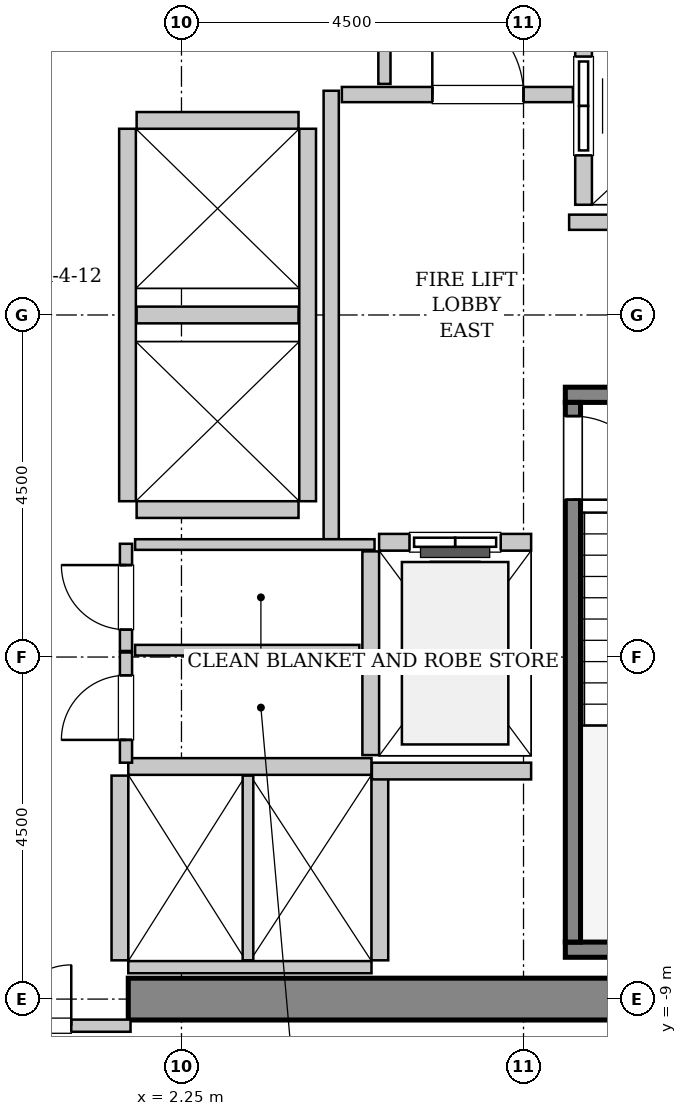
"""IFC4 building model, lengths in metres.
Left out: names, types, materials, properties, quantities, classifications, styles, units other than length and angle.
Written with IfcOpenShell. Run it as: python <this file> out.ifc"""

import sys

from ifc_helpers import new_model, si_unit, direction, frame, frame_2d, origin, place, context, subcontext, project, spatial, rectangle, extrude, source, transform, mapped, element, fill, save


model = new_model("IFC4")
c1 = context("Model", 3, precision=1e-05, world=origin(), true_north=direction((0.0, 1.0)))
c2 = subcontext(c1, "Body", "Model", "MODEL_VIEW")
j1 = project(units=[si_unit("LENGTHUNIT", "METRE"), si_unit("PLANEANGLEUNIT", "RADIAN")], contexts=[c1])
p1 = place(None, origin())
s1 = spatial("IfcSite", under=j1, at=p1, CompositionType="ELEMENT")
p2 = place(p1, origin())
s2 = spatial("IfcBuilding", under=s1, at=p2, CompositionType="ELEMENT")
p3 = place(p2, frame((0.0, 0.0, 106.0)))
s3 = spatial("IfcBuildingStorey", under=s2, at=p3, CompositionType="ELEMENT", Elevation=106.0)
m1 = source(origin(), c2, "Body", "SweptSolid", [
    extrude(rectangle(XDim=9.975, YDim=0.55, at=frame_2d((4.987, 0.0))), origin(), (0.0, 0.0, 1.0), 3.8),
])
p4 = place(p3, frame((1.55, -9.0, 0.0), z_axis=(0.0, 0.0, 1.0), x_axis=(1.0, 0.0, 0.0)))
e1 = element("IfcWall", 1, at=p4, inside=s3, PredefinedType="SHEAR", context=c2, shape_type="MappedRepresentation", body=[
    mapped(m1, transform((0.0, 0.0, 0.0), x_axis=(1.0, 0.0, 0.0), y_axis=(0.0, 1.0, 0.0), z_axis=(0.0, 0.0, 1.0), scale=1.0)),
])
m2 = source(origin(), c2, "Body", "SweptSolid", [
    extrude(rectangle(XDim=3.4, YDim=0.2, at=frame_2d((1.7, 0.0))), origin(), (0.0, 0.0, 1.0), 3.8),
])
p5 = place(p3, frame((7.3, -1.05, 0.0), z_axis=(0.0, 0.0, 1.0), x_axis=(1.0, 0.0, 0.0)))
e2 = element("IfcWall", 2, at=p5, inside=s3, PredefinedType="SOLIDWALL", context=c2, shape_type="MappedRepresentation", body=[
    mapped(m2, transform((0.0, 0.0, 0.0), x_axis=(1.0, 0.0, 0.0), y_axis=(0.0, 1.0, 0.0), z_axis=(0.0, 0.0, 1.0), scale=1.0)),
])
m3 = source(origin(), c2, "Body", "SweptSolid", [
    extrude(rectangle(XDim=3.68, YDim=0.2, at=frame_2d((1.84, 0.0))), origin(), (0.0, 0.0, 1.0), 3.8),
])
p6 = place(p3, frame((7.3, -8.35, 0.0), z_axis=(0.0, 0.0, 1.0), x_axis=(1.0, 0.0, 0.0)))
e3 = element("IfcWall", 3, at=p6, inside=s3, PredefinedType="SOLIDWALL", context=c2, shape_type="MappedRepresentation", body=[
    mapped(m3, transform((0.0, 0.0, 0.0), x_axis=(1.0, 0.0, 0.0), y_axis=(0.0, 1.0, 0.0), z_axis=(0.0, 0.0, 1.0), scale=1.0)),
])
m4 = source(origin(), c2, "Body", "SweptSolid", [
    extrude(rectangle(XDim=7.1, YDim=0.2, at=frame_2d((3.55, 0.0))), origin(), (0.0, 0.0, 1.0), 3.8),
])
p7 = place(p3, frame((7.4, -1.15, 0.0), z_axis=(0.0, 0.0, 1.0), x_axis=(0.0, -1.0, 0.0)))
e4 = element("IfcWall", 4, at=p7, inside=s3, PredefinedType="SOLIDWALL", context=c2, shape_type="MappedRepresentation", body=[
    mapped(m4, transform((0.0, 0.0, 0.0), x_axis=(1.0, 0.0, 0.0), y_axis=(0.0, 1.0, 0.0), z_axis=(0.0, 0.0, 1.0), scale=1.0)),
])
p8 = place(p7, frame((0.18, 0.0, 0.0)))
e5 = element("IfcOpeningElement", 5, at=p8, cuts=e4, PredefinedType="OPENING", context=c2, shape_type="SweptSolid", body=[
    extrude(rectangle(XDim=1.1, YDim=2.15, at=frame_2d((0.55, 1.075))), frame((0.0, 0.11, 0.0), z_axis=(0.0, -1.0, 0.0), x_axis=(1.0, 0.0, 0.0)), (0.0, 0.0, 1.0), 0.22),
])
m5 = source(origin(), c2, "Body", "SweptSolid", [
    extrude(rectangle(XDim=2.0, YDim=0.22, at=frame_2d((1.0, 0.0))), origin(), (0.0, 0.0, 1.0), 3.535),
])
p9 = place(p3, frame((6.85, -2.99, 0.0), z_axis=(0.0, 0.0, 1.0), x_axis=(-1.0, 0.0, 0.0)))
e6 = element("IfcWall", 6, at=p9, inside=s3, PredefinedType="SOLIDWALL", context=c2, shape_type="MappedRepresentation", body=[
    mapped(m5, transform((0.0, 0.0, 0.0), x_axis=(1.0, 0.0, 0.0), y_axis=(0.0, 1.0, 0.0), z_axis=(0.0, 0.0, 1.0), scale=1.0)),
])
p10 = place(p9, frame((0.4, 0.0, 0.0)))
e7 = element("IfcOpeningElement", 7, at=p10, cuts=e6, PredefinedType="OPENING", context=c2, shape_type="SweptSolid", body=[
    extrude(rectangle(XDim=1.2, YDim=2.2, at=frame_2d((0.6, 1.1))), frame((0.0, 0.12, 0.0), z_axis=(0.0, -1.0, 0.0), x_axis=(1.0, 0.0, 0.0)), (0.0, 0.0, 1.0), 0.24),
])
m6 = source(origin(), c2, "Body", "SweptSolid", [
    extrude(rectangle(XDim=2.68, YDim=0.22, at=frame_2d((1.34, 0.0))), origin(), (0.0, 0.0, 1.0), 3.535),
])
p11 = place(p3, frame((4.74, -3.11, 0.0), z_axis=(0.0, 0.0, 1.0), x_axis=(0.0, -1.0, 0.0)))
e8 = element("IfcWall", 8, at=p11, inside=s3, PredefinedType="SOLIDWALL", context=c2, shape_type="MappedRepresentation", body=[
    mapped(m6, transform((0.0, 0.0, 0.0), x_axis=(1.0, 0.0, 0.0), y_axis=(0.0, 1.0, 0.0), z_axis=(0.0, 0.0, 1.0), scale=1.0)),
])
m7 = source(origin(), c2, "Body", "SweptSolid", [
    extrude(rectangle(XDim=5.45, YDim=0.22, at=frame_2d((2.725, 0.0))), origin(), (0.0, 0.0, 1.0), 3.535),
])
p12 = place(p3, frame((7.54, 6.9, 0.0), z_axis=(0.0, 0.0, 1.0), x_axis=(0.0, -1.0, 0.0)))
e9 = element("IfcWall", 9, at=p12, inside=s3, PredefinedType="SOLIDWALL", context=c2, shape_type="MappedRepresentation", body=[
    mapped(m7, transform((0.0, 0.0, 0.0), x_axis=(1.0, 0.0, 0.0), y_axis=(0.0, 1.0, 0.0), z_axis=(0.0, 0.0, 1.0), scale=1.0)),
])
p13 = place(p12, frame((3.5, 0.0, 0.0)))
e10 = element("IfcOpeningElement", 10, at=p13, cuts=e9, PredefinedType="OPENING", context=c2, shape_type="SweptSolid", body=[
    extrude(rectangle(XDim=1.3, YDim=2.3, at=frame_2d((0.65, 1.15))), frame((0.0, 0.12, 0.0), z_axis=(0.0, -1.0, 0.0), x_axis=(1.0, 0.0, 0.0)), (0.0, 0.0, 1.0), 0.24),
])
p14 = place(p12, frame((0.65, 0.0, 0.0)))
e11 = element("IfcOpeningElement", 11, at=p14, cuts=e9, PredefinedType="OPENING", context=c2, shape_type="SweptSolid", body=[
    extrude(rectangle(XDim=1.3, YDim=2.3, at=frame_2d((0.65, 1.15))), frame((0.0, 0.12, 0.0), z_axis=(0.0, -1.0, 0.0), x_axis=(1.0, 0.0, 0.0)), (0.0, 0.0, 1.0), 0.24),
])
m8 = source(origin(), c2, "Body", "SweptSolid", [
    extrude(rectangle(XDim=3.2, YDim=0.22, at=frame_2d((1.6, 0.0))), origin(), (0.0, 0.0, 1.0), 3.535),
])
p15 = place(p3, frame((4.75, -5.94, 0.0), z_axis=(0.0, 0.0, 1.0), x_axis=(-1.0, 0.0, 0.0)))
e12 = element("IfcWall", 12, at=p15, inside=s3, PredefinedType="SOLIDWALL", context=c2, shape_type="MappedRepresentation", body=[
    mapped(m8, transform((0.0, 0.0, 0.0), x_axis=(1.0, 0.0, 0.0), y_axis=(0.0, 1.0, 0.0), z_axis=(0.0, 0.0, 1.0), scale=1.0)),
])
m9 = source(origin(), c2, "Body", "SweptSolid", [
    extrude(rectangle(XDim=3.2, YDim=0.16, at=frame_2d((1.6, 0.0))), origin(), (0.0, 0.0, 1.0), 2.425),
])
p16 = place(p3, frame((1.55, -8.58, 0.0), z_axis=(0.0, 0.0, 1.0), x_axis=(1.0, 0.0, 0.0)))
e13 = element("IfcWall", 13, at=p16, inside=s3, PredefinedType="PARTITIONING", context=c2, shape_type="MappedRepresentation", body=[
    mapped(m9, transform((0.0, 0.0, 0.0), x_axis=(1.0, 0.0, 0.0), y_axis=(0.0, 1.0, 0.0), z_axis=(0.0, 0.0, 1.0), scale=1.0)),
])
m10 = source(origin(), c2, "Body", "SweptSolid", [
    extrude(rectangle(XDim=2.43, YDim=0.22, at=frame_2d((1.215, 0.0))), origin(), (0.0, 0.0, 1.0), 3.535),
])
p17 = place(p3, frame((1.44, -6.06, 0.0), z_axis=(0.0, 0.0, 1.0), x_axis=(0.0, -1.0, 0.0)))
e14 = element("IfcWall", 14, at=p17, inside=s3, PredefinedType="SOLIDWALL", context=c2, shape_type="MappedRepresentation", body=[
    mapped(m10, transform((0.0, 0.0, 0.0), x_axis=(1.0, 0.0, 0.0), y_axis=(0.0, 1.0, 0.0), z_axis=(0.0, 0.0, 1.0), scale=1.0)),
])
m11 = source(origin(), c2, "Body", "SweptSolid", [
    extrude(rectangle(XDim=2.43, YDim=0.14, at=frame_2d((1.215, 0.0))), origin(), (0.0, 0.0, 1.0), 3.535),
])
p18 = place(p3, frame((3.125, -8.49, 0.0), z_axis=(0.0, 0.0, 1.0), x_axis=(0.0, 1.0, 0.0)))
e15 = element("IfcWall", 15, at=p18, inside=s3, PredefinedType="PARTITIONING", context=c2, shape_type="MappedRepresentation", body=[
    mapped(m11, transform((0.0, 0.0, 0.0), x_axis=(1.0, 0.0, 0.0), y_axis=(0.0, 1.0, 0.0), z_axis=(0.0, 0.0, 1.0), scale=1.0)),
])
p19 = place(p3, frame((4.86, -8.49, 0.0), z_axis=(0.0, 0.0, 1.0), x_axis=(0.0, 1.0, 0.0)))
e16 = element("IfcWall", 16, at=p19, inside=s3, PredefinedType="SOLIDWALL", context=c2, shape_type="MappedRepresentation", body=[
    mapped(m10, transform((0.0, 0.0, 0.0), x_axis=(1.0, 0.0, 0.0), y_axis=(0.0, 1.0, 0.0), z_axis=(0.0, 0.0, 1.0), scale=1.0)),
])
m12 = source(origin(), c2, "Body", "SweptSolid", [
    extrude(rectangle(XDim=4.9, YDim=0.22, at=frame_2d((2.45, 0.0))), origin(), (0.0, 0.0, 1.0), 3.535),
])
for number, where, z_axis, x_axis in (
    (17, (1.54, 2.45, 0.0), (0.0, 0.0, 1.0), (0.0, -1.0, 0.0)),
    (18, (3.91, -2.45, 0.0), (0.0, 0.0, 1.0), (0.0, 1.0, 0.0)),
):
    element("IfcWall", number, at=place(p3, frame(where, z_axis=z_axis, x_axis=x_axis)), inside=s3, PredefinedType="SOLIDWALL", context=c2, shape_type="MappedRepresentation", body=[
        mapped(m12, transform((0.0, 0.0, 0.0), x_axis=(1.0, 0.0, 0.0), y_axis=(0.0, 1.0, 0.0), z_axis=(0.0, 0.0, 1.0), scale=1.0)),
    ])
m13 = source(origin(), c2, "Body", "SweptSolid", [
    extrude(rectangle(XDim=2.13, YDim=0.22, at=frame_2d((1.065, 0.0))), origin(), (0.0, 0.0, 1.0), 3.535),
])
for number, where, z_axis, x_axis in (
    (19, (1.66, -2.56, 0.0), (0.0, 0.0, 1.0), (1.0, 0.0, 0.0)),
    (20, (1.66, 0.0, 0.0), (0.0, 0.0, 1.0), (1.0, 0.0, 0.0)),
    (21, (3.79, 2.56, 0.0), (0.0, 0.0, 1.0), (-1.0, 0.0, 0.0)),
):
    element("IfcWall", number, at=place(p3, frame(where, z_axis=z_axis, x_axis=x_axis)), inside=s3, PredefinedType="SOLIDWALL", context=c2, shape_type="MappedRepresentation", body=[
        mapped(m13, transform((0.0, 0.0, 0.0), x_axis=(1.0, 0.0, 0.0), y_axis=(0.0, 1.0, 0.0), z_axis=(0.0, 0.0, 1.0), scale=1.0)),
    ])
m14 = source(origin(), c2, "Body", "SweptSolid", [
    extrude(rectangle(XDim=2.095, YDim=0.22, at=frame_2d((1.048, 0.0))), origin(), (0.0, 0.0, 1.0), 3.535),
])
p20 = place(p3, frame((4.755, -6.0, 0.0), z_axis=(0.0, 0.0, 1.0), x_axis=(1.0, 0.0, 0.0)))
e22 = element("IfcWall", 22, at=p20, inside=s3, PredefinedType="SOLIDWALL", context=c2, shape_type="MappedRepresentation", body=[
    mapped(m14, transform((0.0, 0.0, 0.0), x_axis=(1.0, 0.0, 0.0), y_axis=(0.0, 1.0, 0.0), z_axis=(0.0, 0.0, 1.0), scale=1.0)),
])
m15 = source(origin(), c2, "Body", "SweptSolid", [
    extrude(rectangle(XDim=5.9, YDim=0.2, at=frame_2d((2.95, 0.0))), origin(), (0.0, 0.0, 1.0), 3.535),
])
p21 = place(p3, frame((4.22, -2.95, 0.0), z_axis=(0.0, 0.0, 1.0), x_axis=(0.0, 1.0, 0.0)))
e23 = element("IfcWall", 23, at=p21, inside=s3, PredefinedType="PARTITIONING", context=c2, shape_type="MappedRepresentation", body=[
    mapped(m15, transform((0.0, 0.0, 0.0), x_axis=(1.0, 0.0, 0.0), y_axis=(0.0, 1.0, 0.0), z_axis=(0.0, 0.0, 1.0), scale=1.0)),
])
m16 = source(origin(), c2, "Body", "SweptSolid", [
    extrude(rectangle(XDim=3.04, YDim=0.2, at=frame_2d((1.52, 0.0))), origin(), (0.0, 0.0, 1.0), 3.535),
])
p22 = place(p3, frame((4.36, 2.9, 0.0), z_axis=(0.0, 0.0, 1.0), x_axis=(1.0, 0.0, 0.0)))
e24 = element("IfcWall", 24, at=p22, inside=s3, PredefinedType="PARTITIONING", context=c2, shape_type="MappedRepresentation", body=[
    mapped(m16, transform((0.0, 0.0, 0.0), x_axis=(1.0, 0.0, 0.0), y_axis=(0.0, 1.0, 0.0), z_axis=(0.0, 0.0, 1.0), scale=1.0)),
])
p23 = place(p22, frame((1.19, 0.0, 0.0)))
e25 = element("IfcOpeningElement", 25, at=p23, cuts=e24, PredefinedType="OPENING", context=c2, shape_type="SweptSolid", body=[
    extrude(rectangle(XDim=1.2, YDim=2.15, at=frame_2d((0.6, 1.075))), frame((0.0, 0.11, 0.0), z_axis=(0.0, -1.0, 0.0), x_axis=(1.0, 0.0, 0.0)), (0.0, 0.0, 1.0), 0.22),
])
m17 = source(origin(), c2, "Body", "SweptSolid", [
    extrude(rectangle(XDim=4.11, YDim=0.2, at=frame_2d((2.055, 0.0))), origin(), (0.0, 0.0, 1.0), 3.535),
])
p24 = place(p3, frame((7.35, 1.22, 0.0), z_axis=(0.0, 0.0, 1.0), x_axis=(1.0, 0.0, 0.0)))
e26 = element("IfcWall", 26, at=p24, inside=s3, PredefinedType="PARTITIONING", context=c2, shape_type="MappedRepresentation", body=[
    mapped(m17, transform((0.0, 0.0, 0.0), x_axis=(1.0, 0.0, 0.0), y_axis=(0.0, 1.0, 0.0), z_axis=(0.0, 0.0, 1.0), scale=1.0)),
])
m18 = source(origin(), c2, "Body", "SweptSolid", [
    extrude(rectangle(XDim=3.16, YDim=0.16, at=frame_2d((1.58, 0.0))), origin(), (0.0, 0.0, 1.0), 2.425),
])
p25 = place(p3, frame((-1.58, -9.35, 0.0), z_axis=(0.0, 0.0, 1.0), x_axis=(1.0, 0.0, 0.0)))
e27 = element("IfcWall", 27, at=p25, inside=s3, PredefinedType="PARTITIONING", context=c2, shape_type="MappedRepresentation", body=[
    mapped(m18, transform((0.0, 0.0, 0.0), x_axis=(1.0, 0.0, 0.0), y_axis=(0.0, 1.0, 0.0), z_axis=(0.0, 0.0, 1.0), scale=1.0)),
])
p26 = place(p25, frame((0.78, 0.0, 0.0)))
e28 = element("IfcOpeningElement", 28, at=p26, cuts=e27, PredefinedType="OPENING", context=c2, shape_type="SweptSolid", body=[
    extrude(rectangle(XDim=1.6, YDim=2.3, at=frame_2d((0.8, 1.15))), frame((0.0, 0.09, 0.0), z_axis=(0.0, -1.0, 0.0), x_axis=(1.0, 0.0, 0.0)), (0.0, 0.0, 1.0), 0.18),
])
m19 = source(origin(), c2, "Body", "SweptSolid", [
    extrude(rectangle(XDim=3.015, YDim=0.16, at=frame_2d((1.507, 0.0))), origin(), (0.0, 0.0, 1.0), 3.535),
])
p27 = place(p3, frame((4.92, 3.04, 0.0), z_axis=(0.0, 0.0, 1.0), x_axis=(0.0, 1.0, 0.0)))
e29 = element("IfcWall", 29, at=p27, inside=s3, PredefinedType="PARTITIONING", context=c2, shape_type="MappedRepresentation", body=[
    mapped(m19, transform((0.0, 0.0, 0.0), x_axis=(1.0, 0.0, 0.0), y_axis=(0.0, 1.0, 0.0), z_axis=(0.0, 0.0, 1.0), scale=1.0)),
])
m20 = source(origin(), c2, "Body", "SweptSolid", [
    extrude(rectangle(XDim=1.41, YDim=0.16, at=frame_2d((0.705, 0.0))), origin(), (0.0, 0.0, 1.0), 3.535),
])
p28 = place(p3, frame((1.52, -4.42, 0.0), z_axis=(0.0, 0.0, 1.0), x_axis=(0.0, 1.0, 0.0)))
e30 = element("IfcWall", 30, at=p28, inside=s3, PredefinedType="PARTITIONING", context=c2, shape_type="MappedRepresentation", body=[
    mapped(m20, transform((0.0, 0.0, 0.0), x_axis=(1.0, 0.0, 0.0), y_axis=(0.0, 1.0, 0.0), z_axis=(0.0, 0.0, 1.0), scale=1.0)),
])
p29 = place(p28, frame((0.28, 0.0, 0.0)))
e31 = element("IfcOpeningElement", 31, at=p29, cuts=e30, PredefinedType="OPENING", context=c2, shape_type="SweptSolid", body=[
    extrude(rectangle(XDim=0.85, YDim=2.1, at=frame_2d((0.425, 1.05))), frame((0.0, 0.09, 0.0), z_axis=(0.0, -1.0, 0.0), x_axis=(1.0, 0.0, 0.0)), (0.0, 0.0, 1.0), 0.18),
])
m21 = source(origin(), c2, "Body", "SweptSolid", [
    extrude(rectangle(XDim=3.15, YDim=0.14, at=frame_2d((1.575, 0.0))), origin(), (0.0, 0.0, 1.0), 3.535),
])
p30 = place(p3, frame((1.64, -3.02, 0.0), z_axis=(0.0, 0.0, 1.0), x_axis=(1.0, 0.0, 0.0)))
e32 = element("IfcWall", 32, at=p30, inside=s3, PredefinedType="PARTITIONING", context=c2, shape_type="MappedRepresentation", body=[
    mapped(m21, transform((0.0, 0.0, 0.0), x_axis=(1.0, 0.0, 0.0), y_axis=(0.0, 1.0, 0.0), z_axis=(0.0, 0.0, 1.0), scale=1.0)),
])
m22 = source(origin(), c2, "Body", "SweptSolid", [
    extrude(rectangle(XDim=2.95, YDim=0.14, at=frame_2d((1.475, 0.0))), origin(), (0.0, 0.0, 1.0), 3.535),
])
p31 = place(p3, frame((1.64, -4.41, 0.0), z_axis=(0.0, 0.0, 1.0), x_axis=(1.0, 0.0, 0.0)))
e33 = element("IfcWall", 33, at=p31, inside=s3, PredefinedType="PARTITIONING", context=c2, shape_type="MappedRepresentation", body=[
    mapped(m22, transform((0.0, 0.0, 0.0), x_axis=(1.0, 0.0, 0.0), y_axis=(0.0, 1.0, 0.0), z_axis=(0.0, 0.0, 1.0), scale=1.0)),
])
m23 = source(origin(), c2, "Body", "SweptSolid", [
    extrude(rectangle(XDim=1.45, YDim=0.16, at=frame_2d((0.725, 0.0))), origin(), (0.0, 0.0, 1.0), 3.535),
])
p32 = place(p3, frame((1.52, -5.89, 0.0), z_axis=(0.0, 0.0, 1.0), x_axis=(0.0, 1.0, 0.0)))
e34 = element("IfcWall", 34, at=p32, inside=s3, PredefinedType="PARTITIONING", context=c2, shape_type="MappedRepresentation", body=[
    mapped(m23, transform((0.0, 0.0, 0.0), x_axis=(1.0, 0.0, 0.0), y_axis=(0.0, 1.0, 0.0), z_axis=(0.0, 0.0, 1.0), scale=1.0)),
])
p33 = place(p32, frame((0.3, 0.0, 0.0)))
e35 = element("IfcOpeningElement", 35, at=p33, cuts=e34, PredefinedType="OPENING", context=c2, shape_type="SweptSolid", body=[
    extrude(rectangle(XDim=0.85, YDim=2.1, at=frame_2d((0.425, 1.05))), frame((0.0, 0.09, 0.0), z_axis=(0.0, -1.0, 0.0), x_axis=(1.0, 0.0, 0.0)), (0.0, 0.0, 1.0), 0.18),
])
m24 = source(origin(), c2, "Body", "SweptSolid", [
    extrude(rectangle(XDim=1.1, YDim=2.15, at=frame_2d((0.55, 1.075))), frame((0.0, 0.025, 0.0), z_axis=(0.0, -1.0, 0.0), x_axis=(1.0, 0.0, 0.0)), (0.0, 0.0, 1.0), 0.05),
])
p34 = place(p8, origin())
e36 = element("IfcDoor", 36, at=p34, inside=s3, OperationType="SINGLE_SWING_RIGHT", PredefinedType="DOOR", context=c2, shape_type="MappedRepresentation", body=[
    mapped(m24, transform((0.0, 0.0, 0.0), x_axis=(1.0, 0.0, 0.0), y_axis=(0.0, 1.0, 0.0), z_axis=(0.0, 0.0, 1.0), scale=1.0)),
])
fill(e5, e36)
m25 = source(origin(), c2, "Body", "SweptSolid", [
    extrude(rectangle(XDim=1.2, YDim=2.2, at=frame_2d((0.6, 1.1))), frame((0.0, 0.025, 0.0), z_axis=(0.0, -1.0, 0.0), x_axis=(1.0, 0.0, 0.0)), (0.0, 0.0, 1.0), 0.05),
])
p35 = place(p10, origin())
e37 = element("IfcDoor", 37, at=p35, inside=s3, OperationType="SLIDING_TO_LEFT", PredefinedType="DOOR", context=c2, shape_type="MappedRepresentation", body=[
    mapped(m25, transform((0.0, 0.0, 0.0), x_axis=(1.0, 0.0, 0.0), y_axis=(0.0, 1.0, 0.0), z_axis=(0.0, 0.0, 1.0), scale=1.0)),
])
fill(e7, e37)
m26 = source(origin(), c2, "Body", "SweptSolid", [
    extrude(rectangle(XDim=1.3, YDim=2.3, at=frame_2d((0.65, 1.15))), frame((0.0, 0.025, 0.0), z_axis=(0.0, -1.0, 0.0), x_axis=(1.0, 0.0, 0.0)), (0.0, 0.0, 1.0), 0.05),
])
p36 = place(p13, origin())
e38 = element("IfcDoor", 38, at=p36, inside=s3, OperationType="SLIDING_TO_RIGHT", PredefinedType="DOOR", context=c2, shape_type="MappedRepresentation", body=[
    mapped(m26, transform((0.0, 0.0, 0.0), x_axis=(1.0, 0.0, 0.0), y_axis=(0.0, 1.0, 0.0), z_axis=(0.0, 0.0, 1.0), scale=1.0)),
])
fill(e10, e38)
m27 = source(origin(), c2, "Body", "SweptSolid", [
    extrude(rectangle(XDim=1.2, YDim=2.15, at=frame_2d((0.6, 1.075))), frame((0.0, 0.025, 0.0), z_axis=(0.0, -1.0, 0.0), x_axis=(1.0, 0.0, 0.0)), (0.0, 0.0, 1.0), 0.05),
])
p37 = place(p23, origin())
e39 = element("IfcDoor", 39, at=p37, inside=s3, OperationType="SINGLE_SWING_LEFT", PredefinedType="DOOR", context=c2, shape_type="MappedRepresentation", body=[
    mapped(m27, transform((0.0, 0.0, 0.0), x_axis=(1.0, 0.0, 0.0), y_axis=(0.0, 1.0, 0.0), z_axis=(0.0, 0.0, 1.0), scale=1.0)),
])
fill(e25, e39)
m28 = source(origin(), c2, "Body", "SweptSolid", [
    extrude(rectangle(XDim=1.6, YDim=2.3, at=frame_2d((0.8, 1.15))), frame((0.0, 0.025, 0.0), z_axis=(0.0, -1.0, 0.0), x_axis=(1.0, 0.0, 0.0)), (0.0, 0.0, 1.0), 0.05),
])
p38 = place(p26, origin())
e40 = element("IfcDoor", 40, at=p38, inside=s3, OperationType="DOUBLE_DOOR_SINGLE_SWING", PredefinedType="DOOR", context=c2, shape_type="MappedRepresentation", body=[
    mapped(m28, transform((0.0, 0.0, 0.0), x_axis=(1.0, 0.0, 0.0), y_axis=(0.0, 1.0, 0.0), z_axis=(0.0, 0.0, 1.0), scale=1.0)),
])
fill(e28, e40)
m29 = source(origin(), c2, "Body", "SweptSolid", [
    extrude(rectangle(XDim=0.85, YDim=2.1, at=frame_2d((0.425, 1.05))), frame((0.0, 0.025, 0.0), z_axis=(0.0, -1.0, 0.0), x_axis=(1.0, 0.0, 0.0)), (0.0, 0.0, 1.0), 0.05),
])
p39 = place(p29, origin())
e41 = element("IfcDoor", 41, at=p39, inside=s3, OperationType="SINGLE_SWING_RIGHT", PredefinedType="DOOR", context=c2, shape_type="MappedRepresentation", body=[
    mapped(m29, transform((0.0, 0.0, 0.0), x_axis=(1.0, 0.0, 0.0), y_axis=(0.0, 1.0, 0.0), z_axis=(0.0, 0.0, 1.0), scale=1.0)),
])
fill(e31, e41)
p40 = place(p33, origin())
e42 = element("IfcDoor", 42, at=p40, inside=s3, OperationType="SINGLE_SWING_LEFT", PredefinedType="DOOR", context=c2, shape_type="MappedRepresentation", body=[
    mapped(m29, transform((0.0, 0.0, 0.0), x_axis=(1.0, 0.0, 0.0), y_axis=(0.0, 1.0, 0.0), z_axis=(0.0, 0.0, 1.0), scale=1.0)),
])
fill(e35, e42)
save(model, sys.argv[1])
